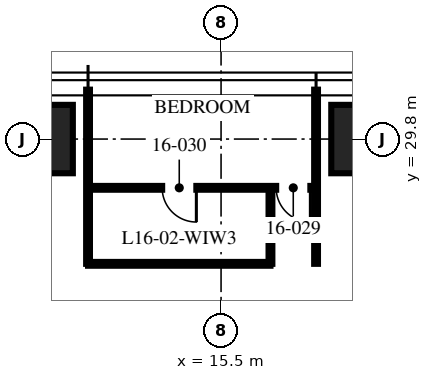
"""IFC4 building model, lengths in metres.
Left out: names, types, materials, properties, quantities, classifications, styles, units other than length and angle.
Written with IfcOpenShell. Run it as: python <this file> out.ifc"""

import sys

from ifc_helpers import new_model, si_unit, direction, frame, frame_2d, origin, origin_2d, place, context, subcontext, project, spatial, rectangle, hollow_rectangle, extrude, element, fill, save


model = new_model("IFC4")
c1 = context("Model", 3, precision=1e-05, world=origin(), true_north=direction((0.0, 1.0)))
c2 = subcontext(c1, "Body", "Model", "MODEL_VIEW")
j1 = project(units=[si_unit("LENGTHUNIT", "METRE"), si_unit("PLANEANGLEUNIT", "RADIAN")], contexts=[c1])
p1 = place(None, origin())
s1 = spatial("IfcSite", under=j1, at=p1, CompositionType="ELEMENT")
p2 = place(p1, origin())
s2 = spatial("IfcBuilding", under=s1, at=p2, CompositionType="ELEMENT")
p3 = place(p2, frame((0.0, 0.0, 66.0)))
s3 = spatial("IfcBuildingStorey", under=s2, at=p3, CompositionType="ELEMENT", Elevation=66.0)
for number, where, z_axis, x_axis in (
    (1, (10.0, 29.8, 0.0), (0.0, 0.0, 1.0), (1.0, 0.0, 0.0)),
    (2, (20.0, 29.8, 0.0), (0.0, 0.0, 1.0), (1.0, 0.0, 0.0)),
):
    element("IfcColumn", number, at=place(p3, frame(where, z_axis=z_axis, x_axis=x_axis)), inside=s3, PredefinedType="COLUMN", context=c2, shape_type="SweptSolid", body=[
        extrude(hollow_rectangle(XDim=3.2, YDim=1.8, WallThickness=0.2, at=origin_2d()), origin(), (0.0, 0.0, 1.0), 3.75),
    ])
for number, where, z_axis, x_axis in (
    (3, (18.0, 26.517, 0.0), (0.0, 0.0, 1.0), (0.0, 1.0, 0.0)),
    (4, (12.0, 26.517, 0.0), (0.0, 0.0, 1.0), (0.0, 1.0, 0.0)),
):
    element("IfcWall", number, at=place(p3, frame(where, z_axis=z_axis, x_axis=x_axis)), inside=s3, PredefinedType="PARTITIONING", context=c2, shape_type="SweptSolid", body=[
        extrude(rectangle(XDim=4.583, YDim=0.1, at=frame_2d((2.292, 0.0))), origin(), (0.0, 0.0, 1.0), 2.71),
    ])
p4 = place(p3, frame((18.0, 28.517, 0.0), z_axis=(0.0, 0.0, 1.0), x_axis=(-1.0, 0.0, 0.0)))
e5 = element("IfcWall", 5, at=p4, inside=s3, PredefinedType="PARTITIONING", context=c2, shape_type="SweptSolid", body=[
    extrude(rectangle(XDim=6.0, YDim=0.1, at=frame_2d((3.0, 0.0))), origin(), (0.0, 0.0, 1.0), 2.61),
])
p5 = place(p4, frame((0.15, 0.0, 0.0)))
e6 = element("IfcOpeningElement", 6, at=p5, cuts=e5, PredefinedType="OPENING", context=c2, shape_type="SweptSolid", body=[
    extrude(rectangle(XDim=0.9, YDim=2.1, at=frame_2d((0.45, 1.05))), frame((0.0, 0.06, 0.0), z_axis=(0.0, -1.0, 0.0), x_axis=(1.0, 0.0, 0.0)), (0.0, 0.0, 1.0), 0.12),
])
p6 = place(p4, frame((3.15, 0.0, 0.0)))
e7 = element("IfcOpeningElement", 7, at=p6, cuts=e5, PredefinedType="OPENING", context=c2, shape_type="SweptSolid", body=[
    extrude(rectangle(XDim=0.9, YDim=2.1, at=frame_2d((0.45, 1.05))), frame((0.0, 0.06, 0.0), z_axis=(0.0, -1.0, 0.0), x_axis=(1.0, 0.0, 0.0)), (0.0, 0.0, 1.0), 0.12),
])
p7 = place(p3, frame((16.8, 26.517, 0.0), z_axis=(0.0, 0.0, 1.0), x_axis=(0.0, 1.0, 0.0)))
e8 = element("IfcWall", 8, at=p7, inside=s3, PredefinedType="PARTITIONING", context=c2, shape_type="SweptSolid", body=[
    extrude(rectangle(XDim=2.0, YDim=0.1, at=frame_2d((1.0, 0.0))), origin(), (0.0, 0.0, 1.0), 3.5),
])
p8 = place(p3, frame((16.8, 26.517, 0.0), z_axis=(0.0, 0.0, 1.0), x_axis=(-1.0, 0.0, 0.0)))
e9 = element("IfcWall", 9, at=p8, inside=s3, PredefinedType="PARTITIONING", context=c2, shape_type="SweptSolid", body=[
    extrude(rectangle(XDim=4.8, YDim=0.1, at=frame_2d((2.4, 0.0))), origin(), (0.0, 0.0, 1.0), 2.61),
])
p9 = place(p5, origin())
e10 = element("IfcDoor", 10, at=p9, inside=s3, OperationType="SINGLE_SWING_LEFT", PredefinedType="DOOR", context=c2, shape_type="SweptSolid", body=[
    extrude(rectangle(XDim=0.9, YDim=2.1, at=frame_2d((0.45, 1.05))), frame((0.0, 0.025, 0.0), z_axis=(0.0, -1.0, 0.0), x_axis=(1.0, 0.0, 0.0)), (0.0, 0.0, 1.0), 0.05),
])
fill(e6, e10)
p10 = place(p6, origin())
e11 = element("IfcDoor", 11, at=p10, inside=s3, OperationType="SINGLE_SWING_LEFT", PredefinedType="DOOR", context=c2, shape_type="SweptSolid", body=[
    extrude(rectangle(XDim=0.9, YDim=2.1, at=frame_2d((0.45, 1.05))), frame((0.0, 0.025, 0.0), z_axis=(0.0, -1.0, 0.0), x_axis=(1.0, 0.0, 0.0)), (0.0, 0.0, 1.0), 0.05),
])
fill(e7, e11)
save(model, sys.argv[1])
